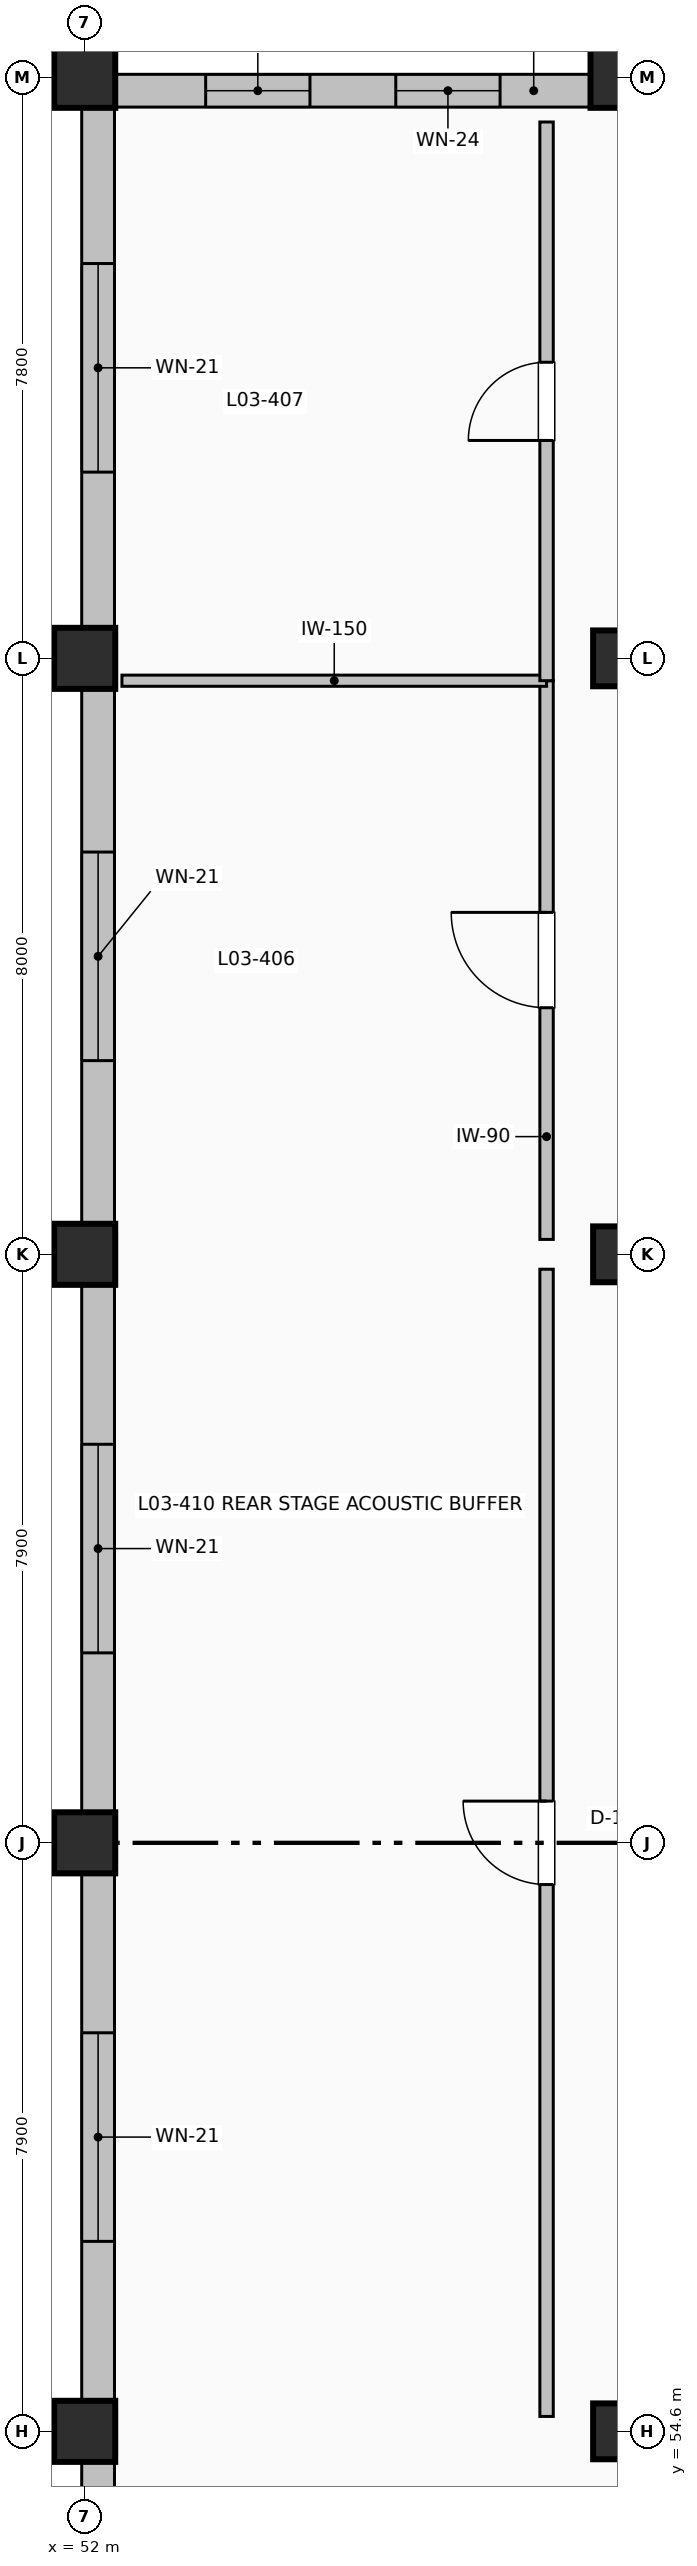
"""IFC4 building model, lengths in metres.
Left out: names, types, materials, properties, quantities, classifications, styles, units other than length and angle.
Written with IfcOpenShell. Run it as: python <this file> out.ifc"""

import sys

from ifc_helpers import new_model, si_unit, direction, frame, frame_2d, origin, origin_2d, place, context, subcontext, project, spatial, rectangle, extrude, element, fill, save


model = new_model("IFC4")
c1 = context("Model", 3, precision=1e-05, world=origin(), true_north=direction((0.0, 1.0)))
c2 = subcontext(c1, "Body", "Model", "MODEL_VIEW")
j1 = project(units=[si_unit("LENGTHUNIT", "METRE"), si_unit("PLANEANGLEUNIT", "RADIAN")], contexts=[c1])
p1 = place(None, origin())
s1 = spatial("IfcSite", under=j1, at=p1, CompositionType="ELEMENT")
p2 = place(p1, origin())
s2 = spatial("IfcBuilding", under=s1, at=p2, CompositionType="ELEMENT")
p3 = place(p2, frame((0.0, 0.0, 15.0)))
s3 = spatial("IfcBuildingStorey", under=s2, at=p3, CompositionType="ELEMENT", Elevation=15.0)
for number, where, z_axis, x_axis in (
    (1, (52.0, 54.6, 0.0), (0.0, 0.0, 1.0), (1.0, 0.0, 0.0)),
    (2, (52.0, 62.5, 0.0), (0.0, 0.0, 1.0), (1.0, 0.0, 0.0)),
    (3, (52.0, 70.4, 0.0), (0.0, 0.0, 1.0), (1.0, 0.0, 0.0)),
    (4, (52.0, 78.4, 0.0), (0.0, 0.0, 1.0), (1.0, 0.0, 0.0)),
    (5, (52.0, 86.2, 0.0), (0.0, 0.0, 1.0), (1.0, 0.0, 0.0)),
):
    element("IfcColumn", number, at=place(p3, frame(where, z_axis=z_axis, x_axis=x_axis)), inside=s3, PredefinedType="COLUMN", context=c2, shape_type="SweptSolid", body=[
        extrude(rectangle(XDim=0.82, YDim=0.82, at=origin_2d()), origin(), (0.0, 0.0, 1.0), 4.5),
    ])
for number, where, z_axis, x_axis in (
    (6, (59.2, 54.6, 0.0), (0.0, 0.0, 1.0), (1.0, 0.0, 0.0)),
    (7, (59.2, 70.4, 0.0), (0.0, 0.0, 1.0), (1.0, 0.0, 0.0)),
    (8, (59.2, 78.4, 0.0), (0.0, 0.0, 1.0), (1.0, 0.0, 0.0)),
):
    element("IfcColumn", number, at=place(p3, frame(where, z_axis=z_axis, x_axis=x_axis)), inside=s3, PredefinedType="COLUMN", context=c2, shape_type="SweptSolid", body=[
        extrude(rectangle(XDim=0.75, YDim=0.75, at=origin_2d()), origin(), (0.0, 0.0, 1.0), 4.5),
    ])
p4 = place(p3, frame((59.2, 86.2, 0.0), z_axis=(0.0, 0.0, 1.0), x_axis=(1.0, 0.0, 0.0)))
e9 = element("IfcColumn", 9, at=p4, inside=s3, PredefinedType="COLUMN", context=c2, shape_type="SweptSolid", body=[
    extrude(rectangle(XDim=0.82, YDim=0.82, at=origin_2d()), origin(), (0.0, 0.0, 1.0), 4.5),
])
p5 = place(p3, frame((52.18, 47.01, 0.0), z_axis=(0.0, 0.0, 1.0), x_axis=(0.0, 1.0, 0.0)))
e10 = element("IfcWall", 10, at=p5, inside=s3, PredefinedType="SOLIDWALL", context=c2, shape_type="SweptSolid", body=[
    extrude(rectangle(XDim=7.18, YDim=0.44, at=frame_2d((3.59, 0.0))), origin(), (0.0, 0.0, 1.0), 3.462),
])
p6 = place(p5, frame((2.19, 0.0, 1.05)))
e11 = element("IfcOpeningElement", 11, at=p6, cuts=e10, PredefinedType="OPENING", context=c2, shape_type="SweptSolid", body=[
    extrude(rectangle(XDim=2.8, YDim=1.35, at=frame_2d((1.4, 0.675))), frame((0.0, 0.23, 0.0), z_axis=(0.0, -1.0, 0.0), x_axis=(1.0, 0.0, 0.0)), (0.0, 0.0, 1.0), 0.46),
])
p7 = place(p3, frame((52.18, 55.01, 0.0), z_axis=(0.0, 0.0, 1.0), x_axis=(0.0, 1.0, 0.0)))
e12 = element("IfcWall", 12, at=p7, inside=s3, PredefinedType="SOLIDWALL", context=c2, shape_type="SweptSolid", body=[
    extrude(rectangle(XDim=7.08, YDim=0.44, at=frame_2d((3.54, 0.0))), origin(), (0.0, 0.0, 1.0), 3.462),
])
p8 = place(p7, frame((2.14, 0.0, 1.05)))
e13 = element("IfcOpeningElement", 13, at=p8, cuts=e12, PredefinedType="OPENING", context=c2, shape_type="SweptSolid", body=[
    extrude(rectangle(XDim=2.8, YDim=1.35, at=frame_2d((1.4, 0.675))), frame((0.0, 0.23, 0.0), z_axis=(0.0, -1.0, 0.0), x_axis=(1.0, 0.0, 0.0)), (0.0, 0.0, 1.0), 0.46),
])
p9 = place(p3, frame((52.18, 62.91, 0.0), z_axis=(0.0, 0.0, 1.0), x_axis=(0.0, 1.0, 0.0)))
e14 = element("IfcWall", 14, at=p9, inside=s3, PredefinedType="SOLIDWALL", context=c2, shape_type="SweptSolid", body=[
    extrude(rectangle(XDim=7.08, YDim=0.44, at=frame_2d((3.54, 0.0))), origin(), (0.0, 0.0, 1.0), 3.462),
])
p10 = place(p9, frame((2.14, 0.0, 1.05)))
e15 = element("IfcOpeningElement", 15, at=p10, cuts=e14, PredefinedType="OPENING", context=c2, shape_type="SweptSolid", body=[
    extrude(rectangle(XDim=2.8, YDim=1.35, at=frame_2d((1.4, 0.675))), frame((0.0, 0.23, 0.0), z_axis=(0.0, -1.0, 0.0), x_axis=(1.0, 0.0, 0.0)), (0.0, 0.0, 1.0), 0.46),
])
p11 = place(p3, frame((52.18, 70.81, 0.0), z_axis=(0.0, 0.0, 1.0), x_axis=(0.0, 1.0, 0.0)))
e16 = element("IfcWall", 16, at=p11, inside=s3, PredefinedType="SOLIDWALL", context=c2, shape_type="SweptSolid", body=[
    extrude(rectangle(XDim=7.18, YDim=0.44, at=frame_2d((3.59, 0.0))), origin(), (0.0, 0.0, 1.0), 3.462),
])
p12 = place(p11, frame((2.19, 0.0, 1.05)))
e17 = element("IfcOpeningElement", 17, at=p12, cuts=e16, PredefinedType="OPENING", context=c2, shape_type="SweptSolid", body=[
    extrude(rectangle(XDim=2.8, YDim=1.35, at=frame_2d((1.4, 0.675))), frame((0.0, 0.23, 0.0), z_axis=(0.0, -1.0, 0.0), x_axis=(1.0, 0.0, 0.0)), (0.0, 0.0, 1.0), 0.46),
])
p13 = place(p3, frame((52.18, 78.81, 0.0), z_axis=(0.0, 0.0, 1.0), x_axis=(0.0, 1.0, 0.0)))
e18 = element("IfcWall", 18, at=p13, inside=s3, PredefinedType="SOLIDWALL", context=c2, shape_type="SweptSolid", body=[
    extrude(rectangle(XDim=6.98, YDim=0.44, at=frame_2d((3.49, 0.0))), origin(), (0.0, 0.0, 1.0), 3.462),
])
p14 = place(p13, frame((2.09, 0.0, 1.05)))
e19 = element("IfcOpeningElement", 19, at=p14, cuts=e18, PredefinedType="OPENING", context=c2, shape_type="SweptSolid", body=[
    extrude(rectangle(XDim=2.8, YDim=1.35, at=frame_2d((1.4, 0.675))), frame((0.0, 0.23, 0.0), z_axis=(0.0, -1.0, 0.0), x_axis=(1.0, 0.0, 0.0)), (0.0, 0.0, 1.0), 0.46),
])
p15 = place(p3, frame((52.41, 86.02, 0.0), z_axis=(0.0, 0.0, 1.0), x_axis=(1.0, 0.0, 0.0)))
e20 = element("IfcWall", 20, at=p15, inside=s3, PredefinedType="SOLIDWALL", context=c2, shape_type="SweptSolid", body=[
    extrude(rectangle(XDim=6.38, YDim=0.44, at=frame_2d((3.19, 0.0))), origin(), (0.0, 0.0, 1.0), 3.462),
])
p16 = place(p15, frame((1.214, 0.0, 1.0)))
e21 = element("IfcOpeningElement", 21, at=p16, cuts=e20, PredefinedType="OPENING", context=c2, shape_type="SweptSolid", body=[
    extrude(rectangle(XDim=1.4, YDim=1.2, at=frame_2d((0.7, 0.6))), frame((0.0, 0.23, 0.0), z_axis=(0.0, -1.0, 0.0), x_axis=(1.0, 0.0, 0.0)), (0.0, 0.0, 1.0), 0.46),
])
p17 = place(p15, frame((3.766, 0.0, 1.0)))
e22 = element("IfcOpeningElement", 22, at=p17, cuts=e20, PredefinedType="OPENING", context=c2, shape_type="SweptSolid", body=[
    extrude(rectangle(XDim=1.4, YDim=1.2, at=frame_2d((0.7, 0.6))), frame((0.0, 0.23, 0.0), z_axis=(0.0, -1.0, 0.0), x_axis=(1.0, 0.0, 0.0)), (0.0, 0.0, 1.0), 0.46),
])
p18 = place(p3, frame((58.2, 70.6, 0.0), z_axis=(0.0, 0.0, 1.0), x_axis=(0.0, 1.0, 0.0)))
e23 = element("IfcWall", 23, at=p18, inside=s3, PredefinedType="PARTITIONING", context=c2, shape_type="SweptSolid", body=[
    extrude(rectangle(XDim=7.5, YDim=0.18, at=frame_2d((3.75, 0.0))), origin(), (0.0, 0.0, 1.0), 4.192),
])
p19 = place(p18, frame((3.11, 0.0, 0.0)))
e24 = element("IfcOpeningElement", 24, at=p19, cuts=e23, PredefinedType="OPENING", context=c2, shape_type="SweptSolid", body=[
    extrude(rectangle(XDim=1.28, YDim=2.14, at=frame_2d((0.64, 1.07))), frame((0.0, 0.1, 0.0), z_axis=(0.0, -1.0, 0.0), x_axis=(1.0, 0.0, 0.0)), (0.0, 0.0, 1.0), 0.2),
])
p20 = place(p3, frame((52.5, 78.1, 0.0), z_axis=(0.0, 0.0, 1.0), x_axis=(1.0, 0.0, 0.0)))
e25 = element("IfcWall", 25, at=p20, inside=s3, PredefinedType="PARTITIONING", context=c2, shape_type="SweptSolid", body=[
    extrude(rectangle(XDim=5.7, YDim=0.15, at=frame_2d((2.85, 0.0))), origin(), (0.0, 0.0, 1.0), 4.192),
])
p21 = place(p3, frame((58.2, 78.1, 0.0), z_axis=(0.0, 0.0, 1.0), x_axis=(0.0, 1.0, 0.0)))
e26 = element("IfcWall", 26, at=p21, inside=s3, PredefinedType="PARTITIONING", context=c2, shape_type="SweptSolid", body=[
    extrude(rectangle(XDim=7.5, YDim=0.18, at=frame_2d((3.75, 0.0))), origin(), (0.0, 0.0, 1.0), 4.192),
])
p22 = place(p21, frame((3.225, 0.0, 0.0)))
e27 = element("IfcOpeningElement", 27, at=p22, cuts=e26, PredefinedType="OPENING", context=c2, shape_type="SweptSolid", body=[
    extrude(rectangle(XDim=1.05, YDim=2.1, at=frame_2d((0.525, 1.05))), frame((0.0, 0.1, 0.0), z_axis=(0.0, -1.0, 0.0), x_axis=(1.0, 0.0, 0.0)), (0.0, 0.0, 1.0), 0.2),
])
p23 = place(p3, frame((58.2, 54.8, 0.0), z_axis=(0.0, 0.0, 1.0), x_axis=(0.0, 1.0, 0.0)))
e28 = element("IfcWall", 28, at=p23, inside=s3, PredefinedType="PARTITIONING", context=c2, shape_type="SweptSolid", body=[
    extrude(rectangle(XDim=15.4, YDim=0.18, at=frame_2d((7.7, 0.0))), origin(), (0.0, 0.0, 1.0), 4.192),
])
p24 = place(p23, frame((7.14, 0.0, 0.0)))
e29 = element("IfcOpeningElement", 29, at=p24, cuts=e28, PredefinedType="OPENING", context=c2, shape_type="SweptSolid", body=[
    extrude(rectangle(XDim=1.12, YDim=2.12, at=frame_2d((0.56, 1.06))), frame((0.0, 0.1, 0.0), z_axis=(0.0, -1.0, 0.0), x_axis=(1.0, 0.0, 0.0)), (0.0, 0.0, 1.0), 0.2),
])
p25 = place(p8, origin())
e30 = element("IfcWindow", 30, at=p25, inside=s3, PartitioningType="SINGLE_PANEL", PredefinedType="WINDOW", context=c2, shape_type="SweptSolid", body=[
    extrude(rectangle(XDim=2.8, YDim=1.35, at=frame_2d((1.4, 0.675))), frame((0.0, 0.03, 0.0), z_axis=(0.0, -1.0, 0.0), x_axis=(1.0, 0.0, 0.0)), (0.0, 0.0, 1.0), 0.06),
])
fill(e13, e30)
p26 = place(p10, origin())
e31 = element("IfcWindow", 31, at=p26, inside=s3, PartitioningType="SINGLE_PANEL", PredefinedType="WINDOW", context=c2, shape_type="SweptSolid", body=[
    extrude(rectangle(XDim=2.8, YDim=1.35, at=frame_2d((1.4, 0.675))), frame((0.0, 0.03, 0.0), z_axis=(0.0, -1.0, 0.0), x_axis=(1.0, 0.0, 0.0)), (0.0, 0.0, 1.0), 0.06),
])
fill(e15, e31)
p27 = place(p12, origin())
e32 = element("IfcWindow", 32, at=p27, inside=s3, PartitioningType="SINGLE_PANEL", PredefinedType="WINDOW", context=c2, shape_type="SweptSolid", body=[
    extrude(rectangle(XDim=2.8, YDim=1.35, at=frame_2d((1.4, 0.675))), frame((0.0, 0.03, 0.0), z_axis=(0.0, -1.0, 0.0), x_axis=(1.0, 0.0, 0.0)), (0.0, 0.0, 1.0), 0.06),
])
fill(e17, e32)
p28 = place(p14, origin())
e33 = element("IfcWindow", 33, at=p28, inside=s3, PartitioningType="SINGLE_PANEL", PredefinedType="WINDOW", context=c2, shape_type="SweptSolid", body=[
    extrude(rectangle(XDim=2.8, YDim=1.35, at=frame_2d((1.4, 0.675))), frame((0.0, 0.03, 0.0), z_axis=(0.0, -1.0, 0.0), x_axis=(1.0, 0.0, 0.0)), (0.0, 0.0, 1.0), 0.06),
])
fill(e19, e33)
p29 = place(p16, origin())
e34 = element("IfcWindow", 34, at=p29, inside=s3, PartitioningType="SINGLE_PANEL", PredefinedType="WINDOW", context=c2, shape_type="SweptSolid", body=[
    extrude(rectangle(XDim=1.4, YDim=1.2, at=frame_2d((0.7, 0.6))), frame((0.0, 0.03, 0.0), z_axis=(0.0, -1.0, 0.0), x_axis=(1.0, 0.0, 0.0)), (0.0, 0.0, 1.0), 0.06),
])
fill(e21, e34)
p30 = place(p17, origin())
e35 = element("IfcWindow", 35, at=p30, inside=s3, PartitioningType="SINGLE_PANEL", PredefinedType="WINDOW", context=c2, shape_type="SweptSolid", body=[
    extrude(rectangle(XDim=1.4, YDim=1.2, at=frame_2d((0.7, 0.6))), frame((0.0, 0.03, 0.0), z_axis=(0.0, -1.0, 0.0), x_axis=(1.0, 0.0, 0.0)), (0.0, 0.0, 1.0), 0.06),
])
fill(e22, e35)
p31 = place(p19, origin())
e36 = element("IfcDoor", 36, at=p31, inside=s3, OperationType="SINGLE_SWING_RIGHT", PredefinedType="DOOR", context=c2, shape_type="SweptSolid", body=[
    extrude(rectangle(XDim=1.28, YDim=2.14, at=frame_2d((0.64, 1.07))), frame((0.0, 0.025, 0.0), z_axis=(0.0, -1.0, 0.0), x_axis=(1.0, 0.0, 0.0)), (0.0, 0.0, 1.0), 0.05),
])
fill(e24, e36)
p32 = place(p22, origin())
e37 = element("IfcDoor", 37, at=p32, inside=s3, OperationType="SINGLE_SWING_LEFT", PredefinedType="DOOR", context=c2, shape_type="SweptSolid", body=[
    extrude(rectangle(XDim=1.05, YDim=2.1, at=frame_2d((0.525, 1.05))), frame((0.0, 0.025, 0.0), z_axis=(0.0, -1.0, 0.0), x_axis=(1.0, 0.0, 0.0)), (0.0, 0.0, 1.0), 0.05),
])
fill(e27, e37)
p33 = place(p24, origin())
e38 = element("IfcDoor", 38, at=p33, inside=s3, OperationType="SINGLE_SWING_RIGHT", PredefinedType="DOOR", context=c2, shape_type="SweptSolid", body=[
    extrude(rectangle(XDim=1.12, YDim=2.12, at=frame_2d((0.56, 1.06))), frame((0.0, 0.025, 0.0), z_axis=(0.0, -1.0, 0.0), x_axis=(1.0, 0.0, 0.0)), (0.0, 0.0, 1.0), 0.05),
])
fill(e29, e38)
save(model, sys.argv[1])
